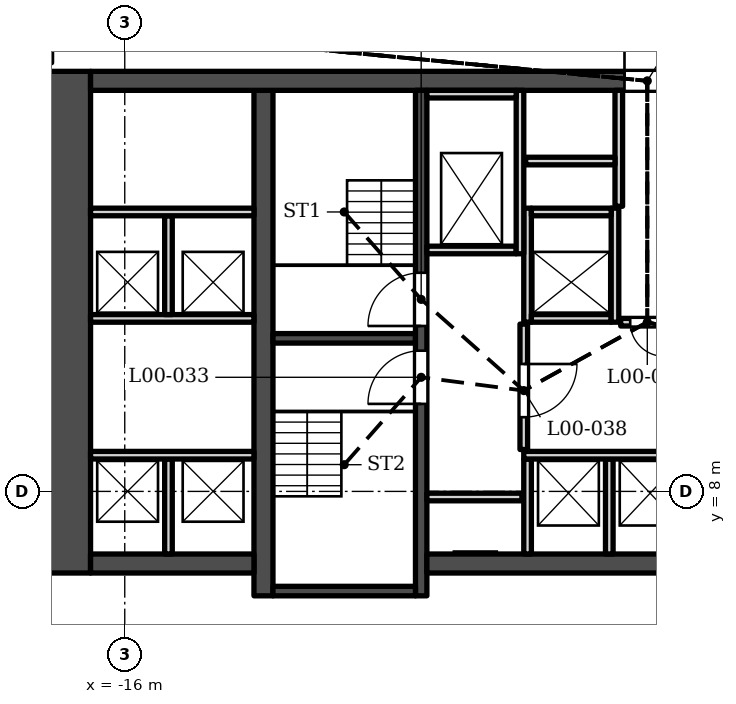
"""IFC4 building model, lengths in metres.
Left out: names, types, materials, properties, quantities, classifications, styles, units other than length and angle.
Written with IfcOpenShell. Run it as: python <this file> out.ifc"""

import sys

from ifc_helpers import new_model, si_unit, direction, frame, frame_2d, origin, place, context, subcontext, project, spatial, rectangle, extrude, element, fill, save


model = new_model("IFC4")
c1 = context("Model", 3, precision=1e-05, world=origin(), true_north=direction((0.0, 1.0)))
c2 = subcontext(c1, "Body", "Model", "MODEL_VIEW")
j1 = project(units=[si_unit("LENGTHUNIT", "METRE"), si_unit("PLANEANGLEUNIT", "RADIAN")], contexts=[c1])
p1 = place(None, origin())
s1 = spatial("IfcSite", under=j1, at=p1, CompositionType="ELEMENT")
p2 = place(p1, origin())
s2 = spatial("IfcBuilding", under=s1, at=p2, CompositionType="ELEMENT")
p3 = place(p2, origin())
s3 = spatial("IfcBuildingStorey", under=s2, at=p3, CompositionType="ELEMENT", Elevation=0.0)
p4 = place(p3, frame((-16.9, 18.802, 0.0), z_axis=(0.0, 0.0, 1.0), x_axis=(1.0, 0.0, 0.0)))
e1 = element("IfcWall", 1, at=p4, inside=s3, PredefinedType="SHEAR", context=c2, shape_type="SweptSolid", body=[
    extrude(rectangle(XDim=33.8, YDim=0.5, at=frame_2d((16.9, 0.0))), origin(), (0.0, 0.0, 1.0), 9.0),
])
p5 = place(p4, frame((14.05, 0.0, 0.0)))
e2 = element("IfcOpeningElement", 2, at=p5, cuts=e1, PredefinedType="OPENING", context=c2, shape_type="SweptSolid", body=[
    extrude(rectangle(XDim=1.2, YDim=2.1, at=frame_2d((0.6, 1.05))), frame((0.0, 0.26, 0.0), z_axis=(0.0, -1.0, 0.0), x_axis=(1.0, 0.0, 0.0)), (0.0, 0.0, 1.0), 0.52),
])
p6 = place(p3, frame((-12.35, 5.253, 0.0), z_axis=(0.0, 0.0, 1.0), x_axis=(0.0, 1.0, 0.0)))
e3 = element("IfcWall", 3, at=p6, inside=s3, PredefinedType="SHEAR", context=c2, shape_type="SweptSolid", body=[
    extrude(rectangle(XDim=13.3, YDim=0.5, at=frame_2d((6.65, 0.0))), origin(), (0.0, 0.0, 1.0), 9.0),
])
p7 = place(p3, frame((-8.2, 5.253, 0.0), z_axis=(0.0, 0.0, 1.0), x_axis=(0.0, 1.0, 0.0)))
e4 = element("IfcWall", 4, at=p7, inside=s3, PredefinedType="SHEAR", context=c2, shape_type="SweptSolid", body=[
    extrude(rectangle(XDim=13.3, YDim=0.3, at=frame_2d((6.65, 0.0))), origin(), (0.0, 0.0, 1.0), 9.0),
])
p8 = place(p7, frame((7.1, 0.0, 0.0)))
e5 = element("IfcOpeningElement", 5, at=p8, cuts=e4, PredefinedType="OPENING", context=c2, shape_type="SweptSolid", body=[
    extrude(rectangle(XDim=1.4, YDim=2.1, at=frame_2d((0.7, 1.05))), frame((0.0, 0.16, 0.0), z_axis=(0.0, -1.0, 0.0), x_axis=(1.0, 0.0, 0.0)), (0.0, 0.0, 1.0), 0.32),
])
p9 = place(p7, frame((5.05, 0.0, 0.0)))
e6 = element("IfcOpeningElement", 6, at=p9, cuts=e4, PredefinedType="OPENING", context=c2, shape_type="SweptSolid", body=[
    extrude(rectangle(XDim=1.4, YDim=2.1, at=frame_2d((0.7, 1.05))), frame((0.0, 0.16, 0.0), z_axis=(0.0, -1.0, 0.0), x_axis=(1.0, 0.0, 0.0)), (0.0, 0.0, 1.0), 0.32),
])
for number, where, z_axis, x_axis in (
    (7, (-12.1, 12.028, 0.0), (0.0, 0.0, 1.0), (1.0, 0.0, 0.0)),
    (8, (-12.1, 5.378, 0.0), (0.0, 0.0, 1.0), (1.0, 0.0, 0.0)),
):
    element("IfcWall", number, at=place(p3, frame(where, z_axis=z_axis, x_axis=x_axis)), inside=s3, PredefinedType="SHEAR", context=c2, shape_type="SweptSolid", body=[
        extrude(rectangle(XDim=3.75, YDim=0.25, at=frame_2d((1.875, 0.0))), origin(), (0.0, 0.0, 1.0), 9.0),
    ])
p10 = place(p3, frame((-8.05, 6.103, 0.0), z_axis=(0.0, 0.0, 1.0), x_axis=(1.0, 0.0, 0.0)))
e9 = element("IfcWall", 9, at=p10, inside=s3, PredefinedType="SHEAR", context=c2, shape_type="SweptSolid", body=[
    extrude(rectangle(XDim=7.05, YDim=0.5, at=frame_2d((3.525, 0.0))), origin(), (0.0, 0.0, 1.0), 9.0),
])
p11 = place(p10, frame((0.825, 0.0, 0.0)))
e10 = element("IfcOpeningElement", 10, at=p11, cuts=e9, PredefinedType="OPENING", context=c2, shape_type="SweptSolid", body=[
    extrude(rectangle(XDim=0.9, YDim=2.1, at=frame_2d((0.45, 1.05))), frame((0.0, 0.26, 0.0), z_axis=(0.0, -1.0, 0.0), x_axis=(1.0, 0.0, 0.0)), (0.0, 0.0, 1.0), 0.52),
])
p12 = place(p3, frame((-12.6, 6.103, 0.0), z_axis=(0.0, 0.0, 1.0), x_axis=(-1.0, 0.0, 0.0)))
e11 = element("IfcWall", 11, at=p12, inside=s3, PredefinedType="SHEAR", context=c2, shape_type="SweptSolid", body=[
    extrude(rectangle(XDim=4.3, YDim=0.5, at=frame_2d((2.15, 0.0))), origin(), (0.0, 0.0, 1.0), 9.0),
])
p13 = place(p3, frame((-17.45, 5.853, 0.0), z_axis=(0.0, 0.0, 1.0), x_axis=(0.0, 1.0, 0.0)))
e12 = element("IfcWall", 12, at=p13, inside=s3, PredefinedType="SHEAR", context=c2, shape_type="SweptSolid", body=[
    extrude(rectangle(XDim=13.2, YDim=1.1, at=frame_2d((6.6, 0.0))), origin(), (0.0, 0.0, 1.0), 9.0),
])
p14 = place(p13, frame((4.1, 0.0, 0.0)))
e13 = element("IfcOpeningElement", 13, at=p14, cuts=e12, PredefinedType="OPENING", context=c2, shape_type="SweptSolid", body=[
    extrude(rectangle(XDim=1.6, YDim=2.1, at=frame_2d((0.8, 1.05))), frame((0.0, 0.56, 0.0), z_axis=(0.0, -1.0, 0.0), x_axis=(1.0, 0.0, 0.0)), (0.0, 0.0, 1.0), 1.12),
])
p15 = place(p13, frame((9.75, 0.0, 0.0)))
e14 = element("IfcOpeningElement", 14, at=p15, cuts=e12, PredefinedType="OPENING", context=c2, shape_type="SweptSolid", body=[
    extrude(rectangle(XDim=0.9, YDim=2.1, at=frame_2d((0.45, 1.05))), frame((0.0, 0.56, 0.0), z_axis=(0.0, -1.0, 0.0), x_axis=(1.0, 0.0, 0.0)), (0.0, 0.0, 1.0), 1.12),
])
for number, where, z_axis, x_axis in (
    (15, (-14.85, 6.353, 0.0), (0.0, 0.0, 1.0), (0.0, 1.0, 0.0)),
    (16, (-5.4, 6.353, 0.0), (0.0, 0.0, 1.0), (0.0, 1.0, 0.0)),
    (17, (-3.25, 6.353, 0.0), (0.0, 0.0, 1.0), (0.0, 1.0, 0.0)),
    (18, (-8.05, 7.853, 0.0), (0.0, 0.0, 1.0), (1.0, 0.0, 0.0)),
):
    element("IfcWall", number, at=place(p3, frame(where, z_axis=z_axis, x_axis=x_axis)), inside=s3, PredefinedType="SOLIDWALL", context=c2, shape_type="SweptSolid", body=[
        extrude(rectangle(XDim=2.5, YDim=0.2, at=frame_2d((1.25, 0.0))), origin(), (0.0, 0.0, 1.0), 8.5),
    ])
p16 = place(p3, frame((-16.9, 8.953, 0.0), z_axis=(0.0, 0.0, 1.0), x_axis=(1.0, 0.0, 0.0)))
e19 = element("IfcWall", 19, at=p16, inside=s3, PredefinedType="SOLIDWALL", context=c2, shape_type="SweptSolid", body=[
    extrude(rectangle(XDim=4.3, YDim=0.2, at=frame_2d((2.15, 0.0))), origin(), (0.0, 0.0, 1.0), 8.5),
])
p17 = place(p16, frame((2.675, 0.0, 0.0)))
e20 = element("IfcOpeningElement", 20, at=p17, cuts=e19, PredefinedType="OPENING", context=c2, shape_type="SweptSolid", body=[
    extrude(rectangle(XDim=1.1, YDim=2.1, at=frame_2d((0.55, 1.05))), frame((0.0, 0.11, 0.0), z_axis=(0.0, -1.0, 0.0), x_axis=(1.0, 0.0, 0.0)), (0.0, 0.0, 1.0), 0.22),
])
p18 = place(p16, frame((0.425, 0.0, 0.0)))
e21 = element("IfcOpeningElement", 21, at=p18, cuts=e19, PredefinedType="OPENING", context=c2, shape_type="SweptSolid", body=[
    extrude(rectangle(XDim=1.1, YDim=2.1, at=frame_2d((0.55, 1.05))), frame((0.0, 0.11, 0.0), z_axis=(0.0, -1.0, 0.0), x_axis=(1.0, 0.0, 0.0)), (0.0, 0.0, 1.0), 0.22),
])
p19 = place(p3, frame((-5.5, 8.953, 0.0), z_axis=(0.0, 0.0, 1.0), x_axis=(1.0, 0.0, 0.0)))
e22 = element("IfcWall", 22, at=p19, inside=s3, PredefinedType="SOLIDWALL", context=c2, shape_type="SweptSolid", body=[
    extrude(rectangle(XDim=4.5, YDim=0.2, at=frame_2d((2.25, 0.0))), origin(), (0.0, 0.0, 1.0), 8.5),
])
p20 = place(p19, frame((0.625, 0.0, 0.0)))
e23 = element("IfcOpeningElement", 23, at=p20, cuts=e22, PredefinedType="OPENING", context=c2, shape_type="SweptSolid", body=[
    extrude(rectangle(XDim=1.1, YDim=2.1, at=frame_2d((0.55, 1.05))), frame((0.0, 0.11, 0.0), z_axis=(0.0, -1.0, 0.0), x_axis=(1.0, 0.0, 0.0)), (0.0, 0.0, 1.0), 0.22),
])
p21 = place(p19, frame((2.775, 0.0, 0.0)))
e24 = element("IfcOpeningElement", 24, at=p21, cuts=e22, PredefinedType="OPENING", context=c2, shape_type="SweptSolid", body=[
    extrude(rectangle(XDim=1.1, YDim=2.1, at=frame_2d((0.55, 1.05))), frame((0.0, 0.11, 0.0), z_axis=(0.0, -1.0, 0.0), x_axis=(1.0, 0.0, 0.0)), (0.0, 0.0, 1.0), 0.22),
])
p22 = place(p3, frame((-5.5, 9.103, 0.0), z_axis=(0.0, 0.0, 1.0), x_axis=(0.0, 1.0, 0.0)))
e25 = element("IfcWall", 25, at=p22, inside=s3, PredefinedType="SOLIDWALL", context=c2, shape_type="SweptSolid", body=[
    extrude(rectangle(XDim=3.3, YDim=0.2, at=frame_2d((1.65, 0.0))), origin(), (0.0, 0.0, 1.0), 8.5),
])
p23 = place(p22, frame((0.85, 0.0, 0.0)))
e26 = element("IfcOpeningElement", 26, at=p23, cuts=e25, PredefinedType="OPENING", context=c2, shape_type="SweptSolid", body=[
    extrude(rectangle(XDim=1.4, YDim=2.1, at=frame_2d((0.7, 1.05))), frame((0.0, 0.11, 0.0), z_axis=(0.0, -1.0, 0.0), x_axis=(1.0, 0.0, 0.0)), (0.0, 0.0, 1.0), 0.22),
])
p24 = place(p3, frame((-2.95, 12.453, 0.0), z_axis=(0.0, 0.0, 1.0), x_axis=(1.0, 0.0, 0.0)))
e27 = element("IfcWall", 27, at=p24, inside=s3, PredefinedType="SOLIDWALL", context=c2, shape_type="SweptSolid", body=[
    extrude(rectangle(XDim=1.4, YDim=0.2, at=frame_2d((0.7, 0.0))), origin(), (0.0, 0.0, 1.0), 8.5),
])
p25 = place(p24, frame((0.25, 0.0, 0.0)))
e28 = element("IfcOpeningElement", 28, at=p25, cuts=e27, PredefinedType="OPENING", context=c2, shape_type="SweptSolid", body=[
    extrude(rectangle(XDim=0.9, YDim=2.1, at=frame_2d((0.45, 1.05))), frame((0.0, 0.11, 0.0), z_axis=(0.0, -1.0, 0.0), x_axis=(1.0, 0.0, 0.0)), (0.0, 0.0, 1.0), 0.22),
])
p26 = place(p3, frame((-16.9, 12.552, 0.0), z_axis=(0.0, 0.0, 1.0), x_axis=(1.0, 0.0, 0.0)))
e29 = element("IfcWall", 29, at=p26, inside=s3, PredefinedType="SOLIDWALL", context=c2, shape_type="SweptSolid", body=[
    extrude(rectangle(XDim=4.3, YDim=0.2, at=frame_2d((2.15, 0.0))), origin(), (0.0, 0.0, 1.0), 8.5),
])
p27 = place(p26, frame((2.675, 0.0, 0.0)))
e30 = element("IfcOpeningElement", 30, at=p27, cuts=e29, PredefinedType="OPENING", context=c2, shape_type="SweptSolid", body=[
    extrude(rectangle(XDim=1.1, YDim=2.1, at=frame_2d((0.55, 1.05))), frame((0.0, 0.11, 0.0), z_axis=(0.0, -1.0, 0.0), x_axis=(1.0, 0.0, 0.0)), (0.0, 0.0, 1.0), 0.22),
])
p28 = place(p26, frame((0.425, 0.0, 0.0)))
e31 = element("IfcOpeningElement", 31, at=p28, cuts=e29, PredefinedType="OPENING", context=c2, shape_type="SweptSolid", body=[
    extrude(rectangle(XDim=1.1, YDim=2.1, at=frame_2d((0.55, 1.05))), frame((0.0, 0.11, 0.0), z_axis=(0.0, -1.0, 0.0), x_axis=(1.0, 0.0, 0.0)), (0.0, 0.0, 1.0), 0.22),
])
p29 = place(p3, frame((-5.4, 12.453, 0.0), z_axis=(0.0, 0.0, 1.0), x_axis=(0.0, 1.0, 0.0)))
e32 = element("IfcWall", 32, at=p29, inside=s3, PredefinedType="SOLIDWALL", context=c2, shape_type="SweptSolid", body=[
    extrude(rectangle(XDim=3.0, YDim=0.2, at=frame_2d((1.5, 0.0))), origin(), (0.0, 0.0, 1.0), 8.5),
])
p30 = place(p3, frame((-5.3, 12.552, 0.0), z_axis=(0.0, 0.0, 1.0), x_axis=(1.0, 0.0, 0.0)))
e33 = element("IfcWall", 33, at=p30, inside=s3, PredefinedType="SOLIDWALL", context=c2, shape_type="SweptSolid", body=[
    extrude(rectangle(XDim=2.1, YDim=0.2, at=frame_2d((1.05, 0.0))), origin(), (0.0, 0.0, 1.0), 8.5),
])
p31 = place(p30, frame((0.35, 0.0, 0.0)))
e34 = element("IfcOpeningElement", 34, at=p31, cuts=e33, PredefinedType="OPENING", context=c2, shape_type="SweptSolid", body=[
    extrude(rectangle(XDim=1.4, YDim=2.4, at=frame_2d((0.7, 1.2))), frame((0.0, 0.11, 0.0), z_axis=(0.0, -1.0, 0.0), x_axis=(1.0, 0.0, 0.0)), (0.0, 0.0, 1.0), 0.22),
])
p32 = place(p3, frame((-3.1, 12.453, 0.0), z_axis=(0.0, 0.0, 1.0), x_axis=(0.0, 1.0, 0.0)))
e35 = element("IfcWall", 35, at=p32, inside=s3, PredefinedType="SOLIDWALL", context=c2, shape_type="SweptSolid", body=[
    extrude(rectangle(XDim=3.0, YDim=0.2, at=frame_2d((1.5, 0.0))), origin(), (0.0, 0.0, 1.0), 8.5),
])
p33 = place(p3, frame((-14.85, 12.653, 0.0), z_axis=(0.0, 0.0, 1.0), x_axis=(0.0, 1.0, 0.0)))
e36 = element("IfcWall", 36, at=p33, inside=s3, PredefinedType="SOLIDWALL", context=c2, shape_type="SweptSolid", body=[
    extrude(rectangle(XDim=2.6, YDim=0.2, at=frame_2d((1.3, 0.0))), origin(), (0.0, 0.0, 1.0), 8.5),
])
p34 = place(p3, frame((-8.05, 14.353, 0.0), z_axis=(0.0, 0.0, 1.0), x_axis=(1.0, 0.0, 0.0)))
e37 = element("IfcWall", 37, at=p34, inside=s3, PredefinedType="SOLIDWALL", context=c2, shape_type="SweptSolid", body=[
    extrude(rectangle(XDim=2.35, YDim=0.2, at=frame_2d((1.175, 0.0))), origin(), (0.0, 0.0, 1.0), 8.5),
])
p35 = place(p34, frame((0.575, 0.0, 0.0)))
e38 = element("IfcOpeningElement", 38, at=p35, cuts=e37, PredefinedType="OPENING", context=c2, shape_type="SweptSolid", body=[
    extrude(rectangle(XDim=1.2, YDim=2.1, at=frame_2d((0.6, 1.05))), frame((0.0, 0.11, 0.0), z_axis=(0.0, -1.0, 0.0), x_axis=(1.0, 0.0, 0.0)), (0.0, 0.0, 1.0), 0.22),
])
for number, where, z_axis, x_axis in (
    (39, (-5.6, 14.253, 0.0), (0.0, 0.0, 1.0), (0.0, 1.0, 0.0)),
    (40, (-16.9, 15.353, 0.0), (0.0, 0.0, 1.0), (1.0, 0.0, 0.0)),
):
    element("IfcWall", number, at=place(p3, frame(where, z_axis=z_axis, x_axis=x_axis)), inside=s3, PredefinedType="SOLIDWALL", context=c2, shape_type="SweptSolid", body=[
        extrude(rectangle(XDim=4.3, YDim=0.2, at=frame_2d((2.15, 0.0))), origin(), (0.0, 0.0, 1.0), 8.5),
    ])
p36 = place(p3, frame((-5.3, 15.353, 0.0), z_axis=(0.0, 0.0, 1.0), x_axis=(1.0, 0.0, 0.0)))
e41 = element("IfcWall", 41, at=p36, inside=s3, PredefinedType="SOLIDWALL", context=c2, shape_type="SweptSolid", body=[
    extrude(rectangle(XDim=2.1, YDim=0.2, at=frame_2d((1.05, 0.0))), origin(), (0.0, 0.0, 1.0), 8.5),
])
p37 = place(p3, frame((-3.0, 15.503, 0.0), z_axis=(0.0, 0.0, 1.0), x_axis=(0.0, 1.0, 0.0)))
e42 = element("IfcWall", 42, at=p37, inside=s3, PredefinedType="SOLIDWALL", context=c2, shape_type="SweptSolid", body=[
    extrude(rectangle(XDim=3.05, YDim=0.2, at=frame_2d((1.525, 0.0))), origin(), (0.0, 0.0, 1.0), 8.5),
])
p38 = place(p37, frame((0.12, 0.0, 0.0)))
e43 = element("IfcOpeningElement", 43, at=p38, cuts=e42, PredefinedType="OPENING", context=c2, shape_type="SweptSolid", body=[
    extrude(rectangle(XDim=0.9, YDim=2.1, at=frame_2d((0.45, 1.05))), frame((0.0, 0.11, 0.0), z_axis=(0.0, -1.0, 0.0), x_axis=(1.0, 0.0, 0.0)), (0.0, 0.0, 1.0), 0.22),
])
p39 = place(p37, frame((1.67, 0.0, 0.0)))
e44 = element("IfcOpeningElement", 44, at=p39, cuts=e42, PredefinedType="OPENING", context=c2, shape_type="SweptSolid", body=[
    extrude(rectangle(XDim=0.9, YDim=2.1, at=frame_2d((0.45, 1.05))), frame((0.0, 0.11, 0.0), z_axis=(0.0, -1.0, 0.0), x_axis=(1.0, 0.0, 0.0)), (0.0, 0.0, 1.0), 0.22),
])
p40 = place(p3, frame((-5.45, 16.693, 0.0), z_axis=(0.0, 0.0, 1.0), x_axis=(1.0, 0.0, 0.0)))
e45 = element("IfcWall", 45, at=p40, inside=s3, PredefinedType="SOLIDWALL", context=c2, shape_type="SweptSolid", body=[
    extrude(rectangle(XDim=2.35, YDim=0.2, at=frame_2d((1.175, 0.0))), origin(), (0.0, 0.0, 1.0), 8.5),
])
p41 = place(p3, frame((-8.05, 18.453, 0.0), z_axis=(0.0, 0.0, 1.0), x_axis=(1.0, 0.0, 0.0)))
e46 = element("IfcWall", 46, at=p41, inside=s3, PredefinedType="SOLIDWALL", context=c2, shape_type="SweptSolid", body=[
    extrude(rectangle(XDim=2.35, YDim=0.2, at=frame_2d((1.175, 0.0))), origin(), (0.0, 0.0, 1.0), 8.5),
])
p42 = place(p20, origin())
e47 = element("IfcDoor", 47, at=p42, inside=s3, OperationType="DOUBLE_DOOR_SLIDING", PredefinedType="DOOR", context=c2, shape_type="SweptSolid", body=[
    extrude(rectangle(XDim=1.1, YDim=2.1, at=frame_2d((0.55, 1.05))), frame((0.0, 0.025, 0.0), z_axis=(0.0, -1.0, 0.0), x_axis=(1.0, 0.0, 0.0)), (0.0, 0.0, 1.0), 0.05),
])
fill(e23, e47)
p43 = place(p21, origin())
e48 = element("IfcDoor", 48, at=p43, inside=s3, OperationType="DOUBLE_DOOR_SLIDING", PredefinedType="DOOR", context=c2, shape_type="SweptSolid", body=[
    extrude(rectangle(XDim=1.1, YDim=2.1, at=frame_2d((0.55, 1.05))), frame((0.0, 0.025, 0.0), z_axis=(0.0, -1.0, 0.0), x_axis=(1.0, 0.0, 0.0)), (0.0, 0.0, 1.0), 0.05),
])
fill(e24, e48)
p44 = place(p31, origin())
e49 = element("IfcDoor", 49, at=p44, inside=s3, OperationType="DOUBLE_DOOR_SLIDING", PredefinedType="DOOR", context=c2, shape_type="SweptSolid", body=[
    extrude(rectangle(XDim=1.4, YDim=2.4, at=frame_2d((0.7, 1.2))), frame((0.0, 0.025, 0.0), z_axis=(0.0, -1.0, 0.0), x_axis=(1.0, 0.0, 0.0)), (0.0, 0.0, 1.0), 0.05),
])
fill(e34, e49)
p45 = place(p35, origin())
e50 = element("IfcDoor", 50, at=p45, inside=s3, OperationType="DOUBLE_DOOR_SLIDING", PredefinedType="DOOR", context=c2, shape_type="SweptSolid", body=[
    extrude(rectangle(XDim=1.2, YDim=2.1, at=frame_2d((0.6, 1.05))), frame((0.0, 0.025, 0.0), z_axis=(0.0, -1.0, 0.0), x_axis=(1.0, 0.0, 0.0)), (0.0, 0.0, 1.0), 0.05),
])
fill(e38, e50)
p46 = place(p17, origin())
e51 = element("IfcDoor", 51, at=p46, inside=s3, OperationType="DOUBLE_DOOR_SLIDING", PredefinedType="DOOR", context=c2, shape_type="SweptSolid", body=[
    extrude(rectangle(XDim=1.1, YDim=2.1, at=frame_2d((0.55, 1.05))), frame((0.0, 0.025, 0.0), z_axis=(0.0, -1.0, 0.0), x_axis=(1.0, 0.0, 0.0)), (0.0, 0.0, 1.0), 0.05),
])
fill(e20, e51)
p47 = place(p27, origin())
e52 = element("IfcDoor", 52, at=p47, inside=s3, OperationType="DOUBLE_DOOR_SLIDING", PredefinedType="DOOR", context=c2, shape_type="SweptSolid", body=[
    extrude(rectangle(XDim=1.1, YDim=2.1, at=frame_2d((0.55, 1.05))), frame((0.0, 0.025, 0.0), z_axis=(0.0, -1.0, 0.0), x_axis=(1.0, 0.0, 0.0)), (0.0, 0.0, 1.0), 0.05),
])
fill(e30, e52)
p48 = place(p18, origin())
e53 = element("IfcDoor", 53, at=p48, inside=s3, OperationType="DOUBLE_DOOR_SLIDING", PredefinedType="DOOR", context=c2, shape_type="SweptSolid", body=[
    extrude(rectangle(XDim=1.1, YDim=2.1, at=frame_2d((0.55, 1.05))), frame((0.0, 0.025, 0.0), z_axis=(0.0, -1.0, 0.0), x_axis=(1.0, 0.0, 0.0)), (0.0, 0.0, 1.0), 0.05),
])
fill(e21, e53)
p49 = place(p28, origin())
e54 = element("IfcDoor", 54, at=p49, inside=s3, OperationType="DOUBLE_DOOR_SLIDING", PredefinedType="DOOR", context=c2, shape_type="SweptSolid", body=[
    extrude(rectangle(XDim=1.1, YDim=2.1, at=frame_2d((0.55, 1.05))), frame((0.0, 0.025, 0.0), z_axis=(0.0, -1.0, 0.0), x_axis=(1.0, 0.0, 0.0)), (0.0, 0.0, 1.0), 0.05),
])
fill(e31, e54)
p50 = place(p8, origin())
e55 = element("IfcDoor", 55, at=p50, inside=s3, OperationType="SINGLE_SWING_LEFT", PredefinedType="DOOR", context=c2, shape_type="SweptSolid", body=[
    extrude(rectangle(XDim=1.4, YDim=2.1, at=frame_2d((0.7, 1.05))), frame((0.0, 0.025, 0.0), z_axis=(0.0, -1.0, 0.0), x_axis=(1.0, 0.0, 0.0)), (0.0, 0.0, 1.0), 0.05),
])
fill(e5, e55)
p51 = place(p9, origin())
e56 = element("IfcDoor", 56, at=p51, inside=s3, OperationType="SINGLE_SWING_LEFT", PredefinedType="DOOR", context=c2, shape_type="SweptSolid", body=[
    extrude(rectangle(XDim=1.4, YDim=2.1, at=frame_2d((0.7, 1.05))), frame((0.0, 0.025, 0.0), z_axis=(0.0, -1.0, 0.0), x_axis=(1.0, 0.0, 0.0)), (0.0, 0.0, 1.0), 0.05),
])
fill(e6, e56)
p52 = place(p5, origin())
e57 = element("IfcDoor", 57, at=p52, inside=s3, OperationType="SINGLE_SWING_LEFT", PredefinedType="DOOR", context=c2, shape_type="SweptSolid", body=[
    extrude(rectangle(XDim=1.2, YDim=2.1, at=frame_2d((0.6, 1.05))), frame((0.0, 0.025, 0.0), z_axis=(0.0, -1.0, 0.0), x_axis=(1.0, 0.0, 0.0)), (0.0, 0.0, 1.0), 0.05),
])
fill(e2, e57)
p53 = place(p25, origin())
e58 = element("IfcDoor", 58, at=p53, inside=s3, OperationType="SINGLE_SWING_RIGHT", PredefinedType="DOOR", context=c2, shape_type="SweptSolid", body=[
    extrude(rectangle(XDim=0.9, YDim=2.1, at=frame_2d((0.45, 1.05))), frame((0.0, 0.025, 0.0), z_axis=(0.0, -1.0, 0.0), x_axis=(1.0, 0.0, 0.0)), (0.0, 0.0, 1.0), 0.05),
])
fill(e28, e58)
p54 = place(p23, origin())
e59 = element("IfcDoor", 59, at=p54, inside=s3, OperationType="SINGLE_SWING_RIGHT", PredefinedType="DOOR", context=c2, shape_type="SweptSolid", body=[
    extrude(rectangle(XDim=1.4, YDim=2.1, at=frame_2d((0.7, 1.05))), frame((0.0, 0.025, 0.0), z_axis=(0.0, -1.0, 0.0), x_axis=(1.0, 0.0, 0.0)), (0.0, 0.0, 1.0), 0.05),
])
fill(e26, e59)
p55 = place(p38, origin())
e60 = element("IfcDoor", 60, at=p55, inside=s3, OperationType="SINGLE_SWING_LEFT", PredefinedType="DOOR", context=c2, shape_type="SweptSolid", body=[
    extrude(rectangle(XDim=0.9, YDim=2.1, at=frame_2d((0.45, 1.05))), frame((0.0, 0.025, 0.0), z_axis=(0.0, -1.0, 0.0), x_axis=(1.0, 0.0, 0.0)), (0.0, 0.0, 1.0), 0.05),
])
fill(e43, e60)
p56 = place(p39, origin())
e61 = element("IfcDoor", 61, at=p56, inside=s3, OperationType="SINGLE_SWING_LEFT", PredefinedType="DOOR", context=c2, shape_type="SweptSolid", body=[
    extrude(rectangle(XDim=0.9, YDim=2.1, at=frame_2d((0.45, 1.05))), frame((0.0, 0.025, 0.0), z_axis=(0.0, -1.0, 0.0), x_axis=(1.0, 0.0, 0.0)), (0.0, 0.0, 1.0), 0.05),
])
fill(e44, e61)
p57 = place(p11, origin())
e62 = element("IfcDoor", 62, at=p57, inside=s3, OperationType="SINGLE_SWING_LEFT", PredefinedType="DOOR", context=c2, shape_type="SweptSolid", body=[
    extrude(rectangle(XDim=0.9, YDim=2.1, at=frame_2d((0.45, 1.05))), frame((0.0, 0.025, 0.0), z_axis=(0.0, -1.0, 0.0), x_axis=(1.0, 0.0, 0.0)), (0.0, 0.0, 1.0), 0.05),
])
fill(e10, e62)
p58 = place(p14, origin())
e63 = element("IfcDoor", 63, at=p58, inside=s3, OperationType="DOUBLE_DOOR_SINGLE_SWING", PredefinedType="DOOR", context=c2, shape_type="SweptSolid", body=[
    extrude(rectangle(XDim=1.6, YDim=2.1, at=frame_2d((0.8, 1.05))), frame((0.0, -0.225, 0.0), z_axis=(0.0, -1.0, 0.0), x_axis=(1.0, 0.0, 0.0)), (0.0, 0.0, 1.0), 0.05),
])
fill(e13, e63)
p59 = place(p15, origin())
e64 = element("IfcDoor", 64, at=p59, inside=s3, OperationType="SINGLE_SWING_RIGHT", PredefinedType="DOOR", context=c2, shape_type="SweptSolid", body=[
    extrude(rectangle(XDim=0.9, YDim=2.1, at=frame_2d((0.45, 1.05))), frame((0.0, -0.225, 0.0), z_axis=(0.0, -1.0, 0.0), x_axis=(1.0, 0.0, 0.0)), (0.0, 0.0, 1.0), 0.05),
])
fill(e14, e64)
save(model, sys.argv[1])
